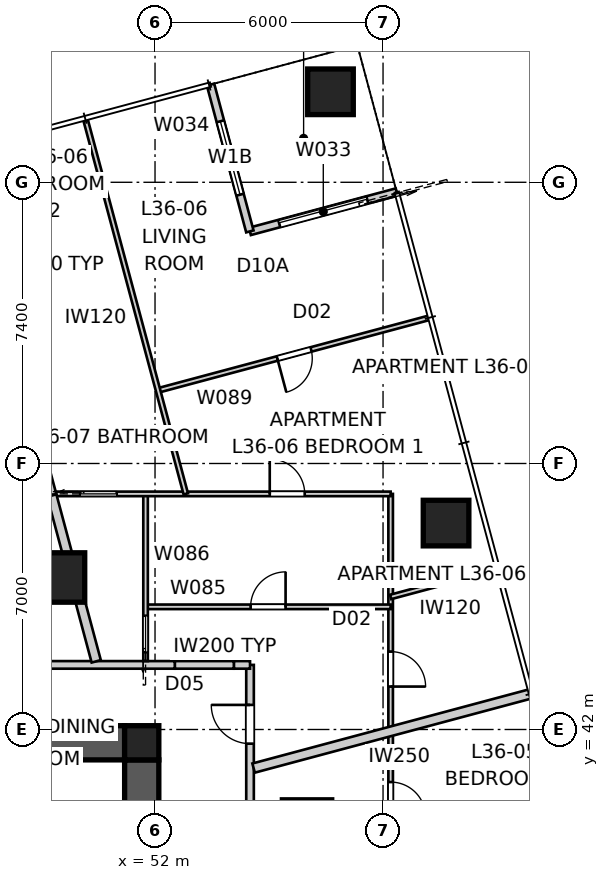
"""IFC4 building model, lengths in metres.
Left out: names, types, materials, properties, quantities, classifications, styles, units other than length and angle.
Written with IfcOpenShell. Run it as: python <this file> out.ifc"""

import sys

from ifc_helpers import new_model, si_unit, direction, frame, frame_2d, origin, origin_2d, place, context, subcontext, project, spatial, polyline, rectangle, outline, extrude, element, fill, save


model = new_model("IFC4")
c1 = context("Model", 3, precision=1e-05, world=origin(), true_north=direction((0.0, 1.0)))
c2 = subcontext(c1, "Body", "Model", "MODEL_VIEW")
j1 = project(units=[si_unit("LENGTHUNIT", "METRE"), si_unit("PLANEANGLEUNIT", "RADIAN")], contexts=[c1])
p1 = place(None, origin())
s1 = spatial("IfcSite", under=j1, at=p1, CompositionType="ELEMENT")
p2 = place(p1, origin())
s2 = spatial("IfcBuilding", under=s1, at=p2, CompositionType="ELEMENT")
p3 = place(p2, frame((0.0, 0.0, 132.0)))
s3 = spatial("IfcBuildingStorey", under=s2, at=p3, CompositionType="ELEMENT", Elevation=132.0)
p4 = place(p3, frame((28.8, 41.65, 0.0), z_axis=(0.0, 0.0, 1.0), x_axis=(1.0, 0.0, 0.0)))
e1 = element("IfcWall", 1, at=p4, inside=s3, PredefinedType="SHEAR", context=c2, shape_type="SweptSolid", body=[
    extrude(outline(polyline([(0.0, -0.45), (22.4, -0.45), (22.4, -0.025), (22.85, -0.025), (22.85, 0.025), (22.4, 0.025), (22.4, 0.45), (0.0, 0.45), (0.0, 0.025), (-0.45, 0.025), (-0.45, -0.025), (0.0, -0.025), (0.0, -0.45)])), origin(), (0.0, 0.0, 1.0), 3.4),
])
p5 = place(p3, frame((51.65, 18.8, 0.0), z_axis=(0.0, 0.0, 1.0), x_axis=(0.0, 1.0, 0.0)))
e2 = element("IfcWall", 2, at=p5, inside=s3, PredefinedType="SHEAR", context=c2, shape_type="SweptSolid", body=[
    extrude(outline(polyline([(0.0, -0.45), (22.4, -0.45), (22.4, -0.025), (22.85, -0.025), (22.85, 0.025), (22.4, 0.025), (22.4, 0.45), (0.0, 0.45), (0.0, 0.025), (-0.45, 0.025), (-0.45, -0.025), (0.0, -0.025), (0.0, -0.45)])), origin(), (0.0, 0.0, 1.0), 3.4),
])
p6 = place(p5, frame((11.14, 0.0, 0.0)))
e3 = element("IfcOpeningElement", 3, at=p6, cuts=e2, PredefinedType="OPENING", context=c2, shape_type="SweptSolid", body=[
    extrude(rectangle(XDim=1.02, YDim=2.4, at=frame_2d((0.51, 1.2))), frame((0.0, 0.46, 0.0), z_axis=(0.0, -1.0, 0.0), x_axis=(1.0, 0.0, 0.0)), (0.0, 0.0, 1.0), 0.92),
])
p7 = place(p3, frame((51.65, 41.65, 0.0), z_axis=(0.0, 0.0, 1.0), x_axis=(1.0, 0.0, 0.0)))
e4 = element("IfcColumn", 4, at=p7, inside=s3, PredefinedType="COLUMN", context=c2, shape_type="SweptSolid", body=[
    extrude(rectangle(XDim=0.9, YDim=0.9, at=origin_2d()), origin(), (0.0, 0.0, 1.0), 3.4),
])
for number, where, z_axis, x_axis in (
    (5, (59.658, 47.432, 0.0), (0.0, 0.0, 1.0), (1.0, 0.0, 0.0)),
    (6, (56.617, 58.781, 0.0), (0.0, 0.0, 1.0), (1.0, 0.0, 0.0)),
):
    element("IfcColumn", number, at=place(p3, frame(where, z_axis=z_axis, x_axis=x_axis)), inside=s3, PredefinedType="COLUMN", context=c2, shape_type="SweptSolid", body=[
        extrude(rectangle(XDim=1.2, YDim=1.2, at=origin_2d()), origin(), (0.0, 0.0, 1.0), 3.4),
    ])
for number, where, z_axis, x_axis in (
    (7, (56.0, 39.5, 0.0), (0.0, 0.0, 1.0), (1.0, 0.0, 0.0)),
    (8, (49.5, 46.0, 0.0), (0.0, 0.0, 1.0), (1.0, 0.0, 0.0)),
):
    element("IfcColumn", number, at=place(p3, frame(where, z_axis=z_axis, x_axis=x_axis)), inside=s3, PredefinedType="COLUMN", context=c2, shape_type="SweptSolid", body=[
        extrude(rectangle(XDim=1.3, YDim=1.3, at=origin_2d()), origin(), (0.0, 0.0, 1.0), 3.4),
    ])
p8 = place(p3, frame((58.359, 56.143, 0.0), z_axis=(0.0, 0.0, 1.0), x_axis=(-0.965919172068, -0.258843877716, 0.0)))
e9 = element("IfcWall", 9, at=p8, inside=s3, PredefinedType="SOLIDWALL", context=c2, shape_type="SweptSolid", body=[
    extrude(rectangle(XDim=4.0, YDim=0.2, at=frame_2d((2.0, 0.0))), origin(), (0.0, 0.0, 1.0), 3.25),
])
p9 = place(p8, frame((0.8, 0.0, 0.0)))
e10 = element("IfcOpeningElement", 10, at=p9, cuts=e9, PredefinedType="OPENING", context=c2, shape_type="SweptSolid", body=[
    extrude(rectangle(XDim=2.4, YDim=2.1, at=frame_2d((1.2, 1.05))), frame((0.0, 0.11, 0.0), z_axis=(0.0, -1.0, 0.0), x_axis=(1.0, 0.0, 0.0)), (0.0, 0.0, 1.0), 0.22),
])
p10 = place(p3, frame((54.496, 55.107, 0.0), z_axis=(0.0, 0.0, 1.0), x_axis=(-0.258786931944, 0.965934430412, 0.0)))
e11 = element("IfcWall", 11, at=p10, inside=s3, PredefinedType="SOLIDWALL", context=c2, shape_type="SweptSolid", body=[
    extrude(rectangle(XDim=4.0, YDim=0.2, at=frame_2d((2.0, 0.0))), origin(), (0.0, 0.0, 1.0), 3.25),
])
p11 = place(p10, frame((1.0, 0.0, 0.45)))
e12 = element("IfcOpeningElement", 12, at=p11, cuts=e11, PredefinedType="OPENING", context=c2, shape_type="SweptSolid", body=[
    extrude(rectangle(XDim=2.0, YDim=1.8, at=frame_2d((1.0, 0.9))), frame((0.0, 0.11, 0.0), z_axis=(0.0, -1.0, 0.0), x_axis=(1.0, 0.0, 0.0)), (0.0, 0.0, 1.0), 0.22),
])
p12 = place(p3, frame((54.5, 15.5, 0.0), z_axis=(0.0, 0.0, 1.0), x_axis=(0.0, 1.0, 0.0)))
e13 = element("IfcWall", 13, at=p12, inside=s3, PredefinedType="PARTITIONING", context=c2, shape_type="SweptSolid", body=[
    extrude(rectangle(XDim=28.2, YDim=0.2, at=frame_2d((14.1, 0.0))), origin(), (0.0, 0.0, 1.0), 3.25),
])
p13 = place(p12, frame((21.527, 0.0, 0.0)))
e14 = element("IfcOpeningElement", 14, at=p13, cuts=e13, PredefinedType="OPENING", context=c2, shape_type="SweptSolid", body=[
    extrude(rectangle(XDim=1.02, YDim=2.34, at=frame_2d((0.51, 1.17))), frame((0.0, 0.11, 0.0), z_axis=(0.0, -1.0, 0.0), x_axis=(1.0, 0.0, 0.0)), (0.0, 0.0, 1.0), 0.22),
])
p14 = place(p12, frame((3.256, 0.0, 0.0)))
e15 = element("IfcOpeningElement", 15, at=p14, cuts=e13, PredefinedType="OPENING", context=c2, shape_type="SweptSolid", body=[
    extrude(rectangle(XDim=1.02, YDim=2.1, at=frame_2d((0.51, 1.05))), frame((0.0, 0.11, 0.0), z_axis=(0.0, -1.0, 0.0), x_axis=(1.0, 0.0, 0.0)), (0.0, 0.0, 1.0), 0.22),
])
p15 = place(p12, frame((26.127, 0.0, 0.0)))
e16 = element("IfcOpeningElement", 16, at=p15, cuts=e13, PredefinedType="OPENING", context=c2, shape_type="SweptSolid", body=[
    extrude(rectangle(XDim=1.02, YDim=2.34, at=frame_2d((0.51, 1.17))), frame((0.0, 0.11, 0.0), z_axis=(0.0, -1.0, 0.0), x_axis=(1.0, 0.0, 0.0)), (0.0, 0.0, 1.0), 0.22),
])
p16 = place(p3, frame((54.5, 43.7, 0.0), z_axis=(0.0, 0.0, 1.0), x_axis=(-1.0, 0.0, 0.0)))
e17 = element("IfcWall", 17, at=p16, inside=s3, PredefinedType="PARTITIONING", context=c2, shape_type="SweptSolid", body=[
    extrude(rectangle(XDim=0.426, YDim=0.2, at=frame_2d((0.213, 0.0))), origin(), (0.0, 0.0, 1.0), 3.25),
])
p17 = place(p3, frame((54.074, 43.7, 0.0), z_axis=(0.0, 0.0, 1.0), x_axis=(-1.0, 0.0, 0.0)))
e18 = element("IfcWall", 18, at=p17, inside=s3, PredefinedType="PARTITIONING", context=c2, shape_type="SweptSolid", body=[
    extrude(rectangle(XDim=1.554, YDim=0.2, at=frame_2d((0.777, 0.0))), origin(), (0.0, 0.0, 1.0), 2.721),
])
p18 = place(p3, frame((52.52, 43.7, 0.0), z_axis=(0.0, 0.0, 1.0), x_axis=(-1.0, 0.0, 0.0)))
e19 = element("IfcWall", 19, at=p18, inside=s3, PredefinedType="PARTITIONING", context=c2, shape_type="SweptSolid", body=[
    extrude(rectangle(XDim=27.02, YDim=0.2, at=frame_2d((13.51, 0.0))), origin(), (0.0, 0.0, 1.0), 3.25),
])
p19 = place(p18, frame((10.872, 0.0, 0.0)))
e20 = element("IfcOpeningElement", 20, at=p19, cuts=e19, PredefinedType="OPENING", context=c2, shape_type="SweptSolid", body=[
    extrude(rectangle(XDim=1.02, YDim=2.34, at=frame_2d((0.51, 1.17))), frame((0.0, 0.11, 0.0), z_axis=(0.0, -1.0, 0.0), x_axis=(1.0, 0.0, 0.0)), (0.0, 0.0, 1.0), 0.22),
])
p20 = place(p18, frame((3.549, 0.0, 0.0)))
e21 = element("IfcOpeningElement", 21, at=p20, cuts=e19, PredefinedType="OPENING", context=c2, shape_type="SweptSolid", body=[
    extrude(rectangle(XDim=1.02, YDim=2.34, at=frame_2d((0.51, 1.17))), frame((0.0, 0.11, 0.0), z_axis=(0.0, -1.0, 0.0), x_axis=(1.0, 0.0, 0.0)), (0.0, 0.0, 1.0), 0.22),
])
p21 = place(p3, frame((61.896, 42.942, 0.0), z_axis=(0.0, 0.0, 1.0), x_axis=(-0.965924988656, -0.258822171171, 0.0)))
e22 = element("IfcWall", 22, at=p21, inside=s3, PredefinedType="PARTITIONING", context=c2, shape_type="SweptSolid", body=[
    extrude(rectangle(XDim=7.56, YDim=0.25, at=frame_2d((3.78, 0.0))), origin(), (0.0, 0.0, 1.0), 3.25),
])
p22 = place(p3, frame((47.119, 56.237, 0.0), z_axis=(0.0, 0.0, 1.0), x_axis=(0.258823120582, -0.965924734258, 0.0)))
e23 = element("IfcWall", 23, at=p22, inside=s3, PredefinedType="PARTITIONING", context=c2, shape_type="SweptSolid", body=[
    extrude(rectangle(XDim=8.366, YDim=0.25, at=frame_2d((4.183, 0.0))), origin(), (0.0, 0.0, 1.0), 2.721),
])
p23 = place(p3, frame((49.284, 48.156, 0.0), z_axis=(0.0, 0.0, 1.0), x_axis=(0.258846876801, -0.965918368378, 0.0)))
e24 = element("IfcWall", 24, at=p23, inside=s3, PredefinedType="PARTITIONING", context=c2, shape_type="SweptSolid", body=[
    extrude(rectangle(XDim=4.516, YDim=0.25, at=frame_2d((2.258, 0.0))), origin(), (0.0, 0.0, 1.0), 3.25),
])
p24 = place(p3, frame((58.2, 48.2, 0.0), z_axis=(0.0, 0.0, 1.0), x_axis=(0.0, -1.0, 0.0)))
e25 = element("IfcWall", 25, at=p24, inside=s3, PredefinedType="PARTITIONING", context=c2, shape_type="SweptSolid", body=[
    extrude(rectangle(XDim=33.512, YDim=0.12, at=frame_2d((16.756, 0.0))), origin(), (0.0, 0.0, 1.0), 2.637),
])
p25 = place(p24, frame((11.441, 0.0, 0.0)))
e26 = element("IfcOpeningElement", 26, at=p25, cuts=e25, PredefinedType="OPENING", context=c2, shape_type="SweptSolid", body=[
    extrude(rectangle(XDim=0.92, YDim=2.34, at=frame_2d((0.46, 1.17))), frame((0.0, 0.07, 0.0), z_axis=(0.0, -1.0, 0.0), x_axis=(1.0, 0.0, 0.0)), (0.0, 0.0, 1.0), 0.14),
])
p26 = place(p24, frame((7.583, 0.0, 0.0)))
e27 = element("IfcOpeningElement", 27, at=p26, cuts=e25, PredefinedType="OPENING", context=c2, shape_type="SweptSolid", body=[
    extrude(rectangle(XDim=0.92, YDim=2.34, at=frame_2d((0.46, 1.17))), frame((0.0, 0.07, 0.0), z_axis=(0.0, -1.0, 0.0), x_axis=(1.0, 0.0, 0.0)), (0.0, 0.0, 1.0), 0.14),
])
p27 = place(p24, frame((25.269, 0.0, 0.0)))
e28 = element("IfcOpeningElement", 28, at=p27, cuts=e25, PredefinedType="OPENING", context=c2, shape_type="SweptSolid", body=[
    extrude(rectangle(XDim=0.92, YDim=2.34, at=frame_2d((0.46, 1.17))), frame((0.0, 0.07, 0.0), z_axis=(0.0, -1.0, 0.0), x_axis=(1.0, 0.0, 0.0)), (0.0, 0.0, 1.0), 0.14),
])
p28 = place(p24, frame((28.662, 0.0, 0.0)))
e29 = element("IfcOpeningElement", 29, at=p28, cuts=e25, PredefinedType="OPENING", context=c2, shape_type="SweptSolid", body=[
    extrude(rectangle(XDim=0.92, YDim=2.34, at=frame_2d((0.46, 1.17))), frame((0.0, 0.07, 0.0), z_axis=(0.0, -1.0, 0.0), x_axis=(1.0, 0.0, 0.0)), (0.0, 0.0, 1.0), 0.14),
])
p29 = place(p24, frame((4.15, 0.0, 0.0)))
e30 = element("IfcOpeningElement", 30, at=p29, cuts=e25, PredefinedType="OPENING", context=c2, shape_type="SweptSolid", body=[
    extrude(rectangle(XDim=0.92, YDim=2.34, at=frame_2d((0.46, 1.17))), frame((0.0, 0.07, 0.0), z_axis=(0.0, -1.0, 0.0), x_axis=(1.0, 0.0, 0.0)), (0.0, 0.0, 1.0), 0.14),
])
p30 = place(p3, frame((51.751, 45.228, 0.0), z_axis=(0.0, 0.0, 1.0), x_axis=(1.0, 0.0, 0.0)))
e31 = element("IfcWall", 31, at=p30, inside=s3, PredefinedType="PARTITIONING", context=c2, shape_type="SweptSolid", body=[
    extrude(rectangle(XDim=6.449, YDim=0.12, at=frame_2d((3.225, 0.0))), origin(), (0.0, 0.0, 1.0), 3.25),
])
p31 = place(p30, frame((2.764, 0.0, 0.0)))
e32 = element("IfcOpeningElement", 32, at=p31, cuts=e31, PredefinedType="OPENING", context=c2, shape_type="SweptSolid", body=[
    extrude(rectangle(XDim=0.92, YDim=2.34, at=frame_2d((0.46, 1.17))), frame((0.0, 0.07, 0.0), z_axis=(0.0, -1.0, 0.0), x_axis=(1.0, 0.0, 0.0)), (0.0, 0.0, 1.0), 0.14),
])
p32 = place(p3, frame((51.751, 43.8, 0.0), z_axis=(0.0, 0.0, 1.0), x_axis=(0.0, 1.0, 0.0)))
e33 = element("IfcWall", 33, at=p32, inside=s3, PredefinedType="PARTITIONING", context=c2, shape_type="SweptSolid", body=[
    extrude(rectangle(XDim=4.4, YDim=0.12, at=frame_2d((2.2, 0.0))), origin(), (0.0, 0.0, 1.0), 3.25),
])
p33 = place(p32, frame((0.234, 0.0, 0.0)))
e34 = element("IfcOpeningElement", 34, at=p33, cuts=e33, PredefinedType="OPENING", context=c2, shape_type="SweptSolid", body=[
    extrude(rectangle(XDim=0.96, YDim=2.1, at=frame_2d((0.48, 1.05))), frame((0.0, 0.07, 0.0), z_axis=(0.0, -1.0, 0.0), x_axis=(1.0, 0.0, 0.0)), (0.0, 0.0, 1.0), 0.14),
])
p34 = place(p3, frame((26.657, 48.2, 0.0), z_axis=(0.0, 0.0, 1.0), x_axis=(1.0, 0.0, 0.0)))
e35 = element("IfcWall", 35, at=p34, inside=s3, PredefinedType="PARTITIONING", context=c2, shape_type="SweptSolid", body=[
    extrude(rectangle(XDim=31.543, YDim=0.12, at=frame_2d((15.771, 0.0))), origin(), (0.0, 0.0, 1.0), 2.637),
])
p35 = place(p34, frame((13.4, 0.0, 0.0)))
e36 = element("IfcOpeningElement", 36, at=p35, cuts=e35, PredefinedType="OPENING", context=c2, shape_type="SweptSolid", body=[
    extrude(rectangle(XDim=0.92, YDim=2.34, at=frame_2d((0.46, 1.17))), frame((0.0, 0.07, 0.0), z_axis=(0.0, -1.0, 0.0), x_axis=(1.0, 0.0, 0.0)), (0.0, 0.0, 1.0), 0.14),
])
p36 = place(p34, frame((20.723, 0.0, 0.0)))
e37 = element("IfcOpeningElement", 37, at=p36, cuts=e35, PredefinedType="OPENING", context=c2, shape_type="SweptSolid", body=[
    extrude(rectangle(XDim=0.92, YDim=2.34, at=frame_2d((0.46, 1.17))), frame((0.0, 0.07, 0.0), z_axis=(0.0, -1.0, 0.0), x_axis=(1.0, 0.0, 0.0)), (0.0, 0.0, 1.0), 0.14),
])
p37 = place(p34, frame((10.117, 0.0, 0.0)))
e38 = element("IfcOpeningElement", 38, at=p37, cuts=e35, PredefinedType="OPENING", context=c2, shape_type="SweptSolid", body=[
    extrude(rectangle(XDim=0.96, YDim=2.1, at=frame_2d((0.48, 1.05))), frame((0.0, 0.07, 0.0), z_axis=(0.0, -1.0, 0.0), x_axis=(1.0, 0.0, 0.0)), (0.0, 0.0, 1.0), 0.14),
])
p38 = place(p34, frame((28.362, 0.0, 0.0)))
e39 = element("IfcOpeningElement", 39, at=p38, cuts=e35, PredefinedType="OPENING", context=c2, shape_type="SweptSolid", body=[
    extrude(rectangle(XDim=0.92, YDim=2.34, at=frame_2d((0.46, 1.17))), frame((0.0, 0.07, 0.0), z_axis=(0.0, -1.0, 0.0), x_axis=(1.0, 0.0, 0.0)), (0.0, 0.0, 1.0), 0.14),
])
p39 = place(p34, frame((23.375, 0.0, 0.0)))
e40 = element("IfcOpeningElement", 40, at=p39, cuts=e35, PredefinedType="OPENING", context=c2, shape_type="SweptSolid", body=[
    extrude(rectangle(XDim=0.96, YDim=2.1, at=frame_2d((0.48, 1.05))), frame((0.0, 0.07, 0.0), z_axis=(0.0, -1.0, 0.0), x_axis=(1.0, 0.0, 0.0)), (0.0, 0.0, 1.0), 0.14),
])
p40 = place(p3, frame((59.205, 52.832, 0.0), z_axis=(0.0, 0.0, 1.0), x_axis=(-0.965926630377, -0.258816044185, 0.0)))
e41 = element("IfcWall", 41, at=p40, inside=s3, PredefinedType="PARTITIONING", context=c2, shape_type="SweptSolid", body=[
    extrude(rectangle(XDim=7.377, YDim=0.12, at=frame_2d((3.688, 0.0))), origin(), (0.0, 0.0, 1.0), 3.25),
])
p41 = place(p40, frame((3.208, 0.0, 0.0)))
e42 = element("IfcOpeningElement", 42, at=p41, cuts=e41, PredefinedType="OPENING", context=c2, shape_type="SweptSolid", body=[
    extrude(rectangle(XDim=0.92, YDim=2.34, at=frame_2d((0.46, 1.17))), frame((0.0, 0.07, 0.0), z_axis=(0.0, -1.0, 0.0), x_axis=(1.0, 0.0, 0.0)), (0.0, 0.0, 1.0), 0.14),
])
p42 = place(p3, frame((52.809, 48.2, 0.0), z_axis=(0.0, 0.0, 1.0), x_axis=(-0.258829444594, 0.965923039694, 0.0)))
e43 = element("IfcWall", 43, at=p42, inside=s3, PredefinedType="PARTITIONING", context=c2, shape_type="SweptSolid", body=[
    extrude(rectangle(XDim=10.196, YDim=0.12, at=frame_2d((5.098, 0.0))), origin(), (0.0, 0.0, 1.0), 3.25),
])
p43 = place(p3, frame((60.974, 46.231, 0.0), z_axis=(0.0, 0.0, 1.0), x_axis=(-0.965929456086, -0.258805498136, 0.0)))
e44 = element("IfcWall", 44, at=p43, inside=s3, PredefinedType="PARTITIONING", context=c2, shape_type="SweptSolid", body=[
    extrude(rectangle(XDim=2.872, YDim=0.12, at=frame_2d((1.436, 0.0))), origin(), (0.0, 0.0, 1.0), 3.25),
])
p44 = place(p9, origin())
e45 = element("IfcDoor", 45, at=p44, inside=s3, OperationType="SLIDING_TO_LEFT", PredefinedType="DOOR", context=c2, shape_type="SweptSolid", body=[
    extrude(rectangle(XDim=2.4, YDim=2.1, at=frame_2d((1.2, 1.05))), frame((0.0, 0.025, 0.0), z_axis=(0.0, -1.0, 0.0), x_axis=(1.0, 0.0, 0.0)), (0.0, 0.0, 1.0), 0.05),
])
fill(e10, e45)
p45 = place(p11, origin())
e46 = element("IfcWindow", 46, at=p45, inside=s3, PartitioningType="SINGLE_PANEL", PredefinedType="WINDOW", context=c2, shape_type="SweptSolid", body=[
    extrude(rectangle(XDim=2.0, YDim=1.8, at=frame_2d((1.0, 0.9))), frame((0.0, 0.03, 0.0), z_axis=(0.0, -1.0, 0.0), x_axis=(1.0, 0.0, 0.0)), (0.0, 0.0, 1.0), 0.06),
])
fill(e12, e46)
p46 = place(p15, origin())
e47 = element("IfcDoor", 47, at=p46, inside=s3, OperationType="SINGLE_SWING_RIGHT", PredefinedType="DOOR", context=c2, shape_type="SweptSolid", body=[
    extrude(rectangle(XDim=1.02, YDim=2.34, at=frame_2d((0.51, 1.17))), frame((0.0, 0.025, 0.0), z_axis=(0.0, -1.0, 0.0), x_axis=(1.0, 0.0, 0.0)), (0.0, 0.0, 1.0), 0.05),
])
fill(e16, e47)
p47 = place(p26, origin())
e48 = element("IfcDoor", 48, at=p47, inside=s3, OperationType="SINGLE_SWING_RIGHT", PredefinedType="DOOR", context=c2, shape_type="SweptSolid", body=[
    extrude(rectangle(XDim=0.92, YDim=2.34, at=frame_2d((0.46, 1.17))), frame((0.0, 0.025, 0.0), z_axis=(0.0, -1.0, 0.0), x_axis=(1.0, 0.0, 0.0)), (0.0, 0.0, 1.0), 0.05),
])
fill(e27, e48)
p48 = place(p31, origin())
e49 = element("IfcDoor", 49, at=p48, inside=s3, OperationType="SINGLE_SWING_RIGHT", PredefinedType="DOOR", context=c2, shape_type="SweptSolid", body=[
    extrude(rectangle(XDim=0.92, YDim=2.34, at=frame_2d((0.46, 1.17))), frame((0.0, 0.025, 0.0), z_axis=(0.0, -1.0, 0.0), x_axis=(1.0, 0.0, 0.0)), (0.0, 0.0, 1.0), 0.05),
])
fill(e32, e49)
p49 = place(p29, origin())
e50 = element("IfcDoor", 50, at=p49, inside=s3, OperationType="SINGLE_SWING_RIGHT", PredefinedType="DOOR", context=c2, shape_type="SweptSolid", body=[
    extrude(rectangle(XDim=0.92, YDim=2.34, at=frame_2d((0.46, 1.17))), frame((0.0, 0.025, 0.0), z_axis=(0.0, -1.0, 0.0), x_axis=(1.0, 0.0, 0.0)), (0.0, 0.0, 1.0), 0.05),
])
fill(e30, e50)
p50 = place(p33, origin())
e51 = element("IfcDoor", 51, at=p50, inside=s3, OperationType="SLIDING_TO_LEFT", PredefinedType="DOOR", context=c2, shape_type="SweptSolid", body=[
    extrude(rectangle(XDim=0.96, YDim=2.1, at=frame_2d((0.48, 1.05))), frame((0.0, 0.025, 0.0), z_axis=(0.0, -1.0, 0.0), x_axis=(1.0, 0.0, 0.0)), (0.0, 0.0, 1.0), 0.05),
])
fill(e34, e51)
p51 = place(p38, origin())
e52 = element("IfcDoor", 52, at=p51, inside=s3, OperationType="SINGLE_SWING_LEFT", PredefinedType="DOOR", context=c2, shape_type="SweptSolid", body=[
    extrude(rectangle(XDim=0.92, YDim=2.34, at=frame_2d((0.46, 1.17))), frame((0.0, 0.025, 0.0), z_axis=(0.0, -1.0, 0.0), x_axis=(1.0, 0.0, 0.0)), (0.0, 0.0, 1.0), 0.05),
])
fill(e39, e52)
p52 = place(p39, origin())
e53 = element("IfcDoor", 53, at=p52, inside=s3, OperationType="SLIDING_TO_LEFT", PredefinedType="DOOR", context=c2, shape_type="SweptSolid", body=[
    extrude(rectangle(XDim=0.96, YDim=2.1, at=frame_2d((0.48, 1.05))), frame((0.0, 0.025, 0.0), z_axis=(0.0, -1.0, 0.0), x_axis=(1.0, 0.0, 0.0)), (0.0, 0.0, 1.0), 0.05),
])
fill(e40, e53)
p53 = place(p41, origin())
e54 = element("IfcDoor", 54, at=p53, inside=s3, OperationType="SINGLE_SWING_RIGHT", PredefinedType="DOOR", context=c2, shape_type="SweptSolid", body=[
    extrude(rectangle(XDim=0.92, YDim=2.34, at=frame_2d((0.46, 1.17))), frame((0.0, 0.025, 0.0), z_axis=(0.0, -1.0, 0.0), x_axis=(1.0, 0.0, 0.0)), (0.0, 0.0, 1.0), 0.05),
])
fill(e42, e54)
save(model, sys.argv[1])
